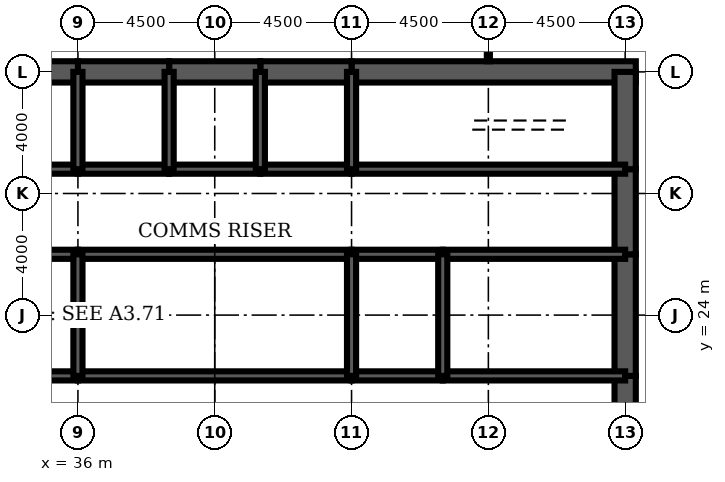
"""IFC4 building model, lengths in metres.
Left out: names, types, materials, properties, quantities, classifications, styles, units other than length and angle.
Written with IfcOpenShell. Run it as: python <this file> out.ifc"""

import sys

from ifc_helpers import new_model, si_unit, direction, frame, frame_2d, origin, place, context, subcontext, project, spatial, rectangle, extrude, element, fill, save


model = new_model("IFC4")
c1 = context("Model", 3, precision=1e-05, world=origin(), true_north=direction((0.0, 1.0)))
c2 = subcontext(c1, "Body", "Model", "MODEL_VIEW")
j1 = project(units=[si_unit("LENGTHUNIT", "METRE"), si_unit("PLANEANGLEUNIT", "RADIAN")], contexts=[c1])
p1 = place(None, origin())
s1 = spatial("IfcSite", under=j1, at=p1, CompositionType="ELEMENT")
p2 = place(p1, origin())
s2 = spatial("IfcBuilding", under=s1, at=p2, CompositionType="ELEMENT")
p3 = place(p2, frame((0.0, 0.0, 304.7)))
s3 = spatial("IfcBuildingStorey", under=s2, at=p3, CompositionType="ELEMENT", Elevation=304.7)
p4 = place(p3, frame((54.35, 32.0, 0.0), z_axis=(0.0, 0.0, 1.0), x_axis=(-1.0, 0.0, 0.0)))
e1 = element("IfcWall", 1, at=p4, inside=s3, PredefinedType="SHEAR", context=c2, shape_type="SweptSolid", body=[
    extrude(rectangle(XDim=9.35, YDim=0.7, at=frame_2d((4.675, 0.0))), origin(), (0.0, 0.0, 1.0), 4.2),
])
for number, where, z_axis, x_axis in (
    (2, (45.0, 32.0, 0.0), (0.0, 0.0, 1.0), (-1.0, 0.0, 0.0)),
    (3, (42.0, 32.0, 0.0), (0.0, 0.0, 1.0), (-1.0, 0.0, 0.0)),
    (4, (39.0, 32.0, 0.0), (0.0, 0.0, 1.0), (-1.0, 0.0, 0.0)),
    (5, (36.0, 32.0, 0.0), (0.0, 0.0, 1.0), (-1.0, 0.0, 0.0)),
):
    element("IfcWall", number, at=place(p3, frame(where, z_axis=z_axis, x_axis=x_axis)), inside=s3, PredefinedType="SHEAR", context=c2, shape_type="SweptSolid", body=[
        extrude(rectangle(XDim=3.0, YDim=0.7, at=frame_2d((1.5, 0.0))), origin(), (0.0, 0.0, 1.0), 4.2),
    ])
p5 = place(p3, frame((54.0, 19.2, 0.0), z_axis=(0.0, 0.0, 1.0), x_axis=(0.0, 1.0, 0.0)))
e6 = element("IfcWall", 6, at=p5, inside=s3, PredefinedType="SHEAR", context=c2, shape_type="SweptSolid", body=[
    extrude(rectangle(XDim=2.8, YDim=0.7, at=frame_2d((1.4, 0.0))), origin(), (0.0, 0.0, 1.0), 4.2),
])
p6 = place(p5, frame((0.4, 0.0, 0.0)))
e7 = element("IfcOpeningElement", 7, at=p6, cuts=e6, PredefinedType="OPENING", context=c2, shape_type="SweptSolid", body=[
    extrude(rectangle(XDim=1.8, YDim=2.1, at=frame_2d((0.9, 1.05))), frame((0.0, 0.36, 0.0), z_axis=(0.0, -1.0, 0.0), x_axis=(1.0, 0.0, 0.0)), (0.0, 0.0, 1.0), 0.72),
])
p7 = place(p3, frame((54.0, 22.0, 0.0), z_axis=(0.0, 0.0, 1.0), x_axis=(0.0, 1.0, 0.0)))
e8 = element("IfcWall", 8, at=p7, inside=s3, PredefinedType="SHEAR", context=c2, shape_type="SweptSolid", body=[
    extrude(rectangle(XDim=4.0, YDim=0.7, at=frame_2d((2.0, 0.0))), origin(), (0.0, 0.0, 1.0), 4.2),
])
p8 = place(p3, frame((54.0, 26.0, 0.0), z_axis=(0.0, 0.0, 1.0), x_axis=(0.0, 1.0, 0.0)))
e9 = element("IfcWall", 9, at=p8, inside=s3, PredefinedType="SHEAR", context=c2, shape_type="SweptSolid", body=[
    extrude(rectangle(XDim=2.8, YDim=0.7, at=frame_2d((1.4, 0.0))), origin(), (0.0, 0.0, 1.0), 4.2),
])
p9 = place(p8, frame((0.6, 0.0, 0.0)))
e10 = element("IfcOpeningElement", 10, at=p9, cuts=e9, PredefinedType="OPENING", context=c2, shape_type="SweptSolid", body=[
    extrude(rectangle(XDim=1.8, YDim=2.1, at=frame_2d((0.9, 1.05))), frame((0.0, 0.36, 0.0), z_axis=(0.0, -1.0, 0.0), x_axis=(1.0, 0.0, 0.0)), (0.0, 0.0, 1.0), 0.72),
])
p10 = place(p3, frame((54.0, 28.8, 0.0), z_axis=(0.0, 0.0, 1.0), x_axis=(0.0, 1.0, 0.0)))
e11 = element("IfcWall", 11, at=p10, inside=s3, PredefinedType="SHEAR", context=c2, shape_type="SweptSolid", body=[
    extrude(rectangle(XDim=3.2, YDim=0.7, at=frame_2d((1.6, 0.0))), origin(), (0.0, 0.0, 1.0), 4.2),
])
p11 = place(p3, frame((33.0, 28.8, 0.0), z_axis=(0.0, 0.0, 1.0), x_axis=(1.0, 0.0, 0.0)))
e12 = element("IfcWall", 12, at=p11, inside=s3, PredefinedType="SOLIDWALL", context=c2, shape_type="SweptSolid", body=[
    extrude(rectangle(XDim=3.0, YDim=0.3, at=frame_2d((1.5, 0.0))), origin(), (0.0, 0.0, 1.0), 4.2),
])
p12 = place(p11, frame((0.95, 0.0, 0.0)))
e13 = element("IfcOpeningElement", 13, at=p12, cuts=e12, PredefinedType="OPENING", context=c2, shape_type="SweptSolid", body=[
    extrude(rectangle(XDim=1.1, YDim=2.2, at=frame_2d((0.55, 1.1))), frame((0.0, 0.16, 0.0), z_axis=(0.0, -1.0, 0.0), x_axis=(1.0, 0.0, 0.0)), (0.0, 0.0, 1.0), 0.32),
])
p13 = place(p3, frame((36.0, 28.8, 0.0), z_axis=(0.0, 0.0, 1.0), x_axis=(1.0, 0.0, 0.0)))
e14 = element("IfcWall", 14, at=p13, inside=s3, PredefinedType="SOLIDWALL", context=c2, shape_type="SweptSolid", body=[
    extrude(rectangle(XDim=3.0, YDim=0.3, at=frame_2d((1.5, 0.0))), origin(), (0.0, 0.0, 1.0), 4.2),
])
p14 = place(p13, frame((1.0, 0.0, 0.0)))
e15 = element("IfcOpeningElement", 15, at=p14, cuts=e14, PredefinedType="OPENING", context=c2, shape_type="SweptSolid", body=[
    extrude(rectangle(XDim=1.0, YDim=2.1, at=frame_2d((0.5, 1.05))), frame((0.0, 0.16, 0.0), z_axis=(0.0, -1.0, 0.0), x_axis=(1.0, 0.0, 0.0)), (0.0, 0.0, 1.0), 0.32),
])
p15 = place(p3, frame((39.0, 28.8, 0.0), z_axis=(0.0, 0.0, 1.0), x_axis=(1.0, 0.0, 0.0)))
e16 = element("IfcWall", 16, at=p15, inside=s3, PredefinedType="SOLIDWALL", context=c2, shape_type="SweptSolid", body=[
    extrude(rectangle(XDim=3.0, YDim=0.3, at=frame_2d((1.5, 0.0))), origin(), (0.0, 0.0, 1.0), 4.2),
])
p16 = place(p15, frame((1.0, 0.0, 0.0)))
e17 = element("IfcOpeningElement", 17, at=p16, cuts=e16, PredefinedType="OPENING", context=c2, shape_type="SweptSolid", body=[
    extrude(rectangle(XDim=1.0, YDim=2.1, at=frame_2d((0.5, 1.05))), frame((0.0, 0.16, 0.0), z_axis=(0.0, -1.0, 0.0), x_axis=(1.0, 0.0, 0.0)), (0.0, 0.0, 1.0), 0.32),
])
p17 = place(p3, frame((42.0, 28.8, 0.0), z_axis=(0.0, 0.0, 1.0), x_axis=(1.0, 0.0, 0.0)))
e18 = element("IfcWall", 18, at=p17, inside=s3, PredefinedType="SOLIDWALL", context=c2, shape_type="SweptSolid", body=[
    extrude(rectangle(XDim=3.0, YDim=0.3, at=frame_2d((1.5, 0.0))), origin(), (0.0, 0.0, 1.0), 4.2),
])
p18 = place(p17, frame((0.95, 0.0, 0.0)))
e19 = element("IfcOpeningElement", 19, at=p18, cuts=e18, PredefinedType="OPENING", context=c2, shape_type="SweptSolid", body=[
    extrude(rectangle(XDim=1.1, YDim=2.2, at=frame_2d((0.55, 1.1))), frame((0.0, 0.16, 0.0), z_axis=(0.0, -1.0, 0.0), x_axis=(1.0, 0.0, 0.0)), (0.0, 0.0, 1.0), 0.32),
])
p19 = place(p3, frame((45.0, 28.8, 0.0), z_axis=(0.0, 0.0, 1.0), x_axis=(1.0, 0.0, 0.0)))
e20 = element("IfcWall", 20, at=p19, inside=s3, PredefinedType="SOLIDWALL", context=c2, shape_type="SweptSolid", body=[
    extrude(rectangle(XDim=9.0, YDim=0.3, at=frame_2d((4.5, 0.0))), origin(), (0.0, 0.0, 1.0), 4.2),
])
p20 = place(p19, frame((7.35, 0.0, 0.0)))
e21 = element("IfcOpeningElement", 21, at=p20, cuts=e20, PredefinedType="OPENING", context=c2, shape_type="SweptSolid", body=[
    extrude(rectangle(XDim=1.0, YDim=2.1, at=frame_2d((0.5, 1.05))), frame((0.0, 0.16, 0.0), z_axis=(0.0, -1.0, 0.0), x_axis=(1.0, 0.0, 0.0)), (0.0, 0.0, 1.0), 0.32),
])
p21 = place(p3, frame((27.0, 22.0, 0.0), z_axis=(0.0, 0.0, 1.0), x_axis=(1.0, 0.0, 0.0)))
e22 = element("IfcWall", 22, at=p21, inside=s3, PredefinedType="SOLIDWALL", context=c2, shape_type="SweptSolid", body=[
    extrude(rectangle(XDim=9.0, YDim=0.3, at=frame_2d((4.5, 0.0))), origin(), (0.0, 0.0, 1.0), 4.2),
])
p22 = place(p21, frame((4.0, 0.0, 0.0)))
e23 = element("IfcOpeningElement", 23, at=p22, cuts=e22, PredefinedType="OPENING", context=c2, shape_type="SweptSolid", body=[
    extrude(rectangle(XDim=1.0, YDim=2.1, at=frame_2d((0.5, 1.05))), frame((0.0, 0.16, 0.0), z_axis=(0.0, -1.0, 0.0), x_axis=(1.0, 0.0, 0.0)), (0.0, 0.0, 1.0), 0.32),
])
p23 = place(p3, frame((36.0, 22.0, 0.0), z_axis=(0.0, 0.0, 1.0), x_axis=(1.0, 0.0, 0.0)))
e24 = element("IfcWall", 24, at=p23, inside=s3, PredefinedType="SOLIDWALL", context=c2, shape_type="SweptSolid", body=[
    extrude(rectangle(XDim=9.0, YDim=0.3, at=frame_2d((4.5, 0.0))), origin(), (0.0, 0.0, 1.0), 4.2),
])
p24 = place(p23, frame((4.0, 0.0, 0.0)))
e25 = element("IfcOpeningElement", 25, at=p24, cuts=e24, PredefinedType="OPENING", context=c2, shape_type="SweptSolid", body=[
    extrude(rectangle(XDim=1.0, YDim=2.1, at=frame_2d((0.5, 1.05))), frame((0.0, 0.16, 0.0), z_axis=(0.0, -1.0, 0.0), x_axis=(1.0, 0.0, 0.0)), (0.0, 0.0, 1.0), 0.32),
])
p25 = place(p3, frame((45.0, 22.0, 0.0), z_axis=(0.0, 0.0, 1.0), x_axis=(1.0, 0.0, 0.0)))
e26 = element("IfcWall", 26, at=p25, inside=s3, PredefinedType="SOLIDWALL", context=c2, shape_type="SweptSolid", body=[
    extrude(rectangle(XDim=3.0, YDim=0.3, at=frame_2d((1.5, 0.0))), origin(), (0.0, 0.0, 1.0), 4.2),
])
p26 = place(p25, frame((1.0, 0.0, 0.0)))
e27 = element("IfcOpeningElement", 27, at=p26, cuts=e26, PredefinedType="OPENING", context=c2, shape_type="SweptSolid", body=[
    extrude(rectangle(XDim=1.0, YDim=2.1, at=frame_2d((0.5, 1.05))), frame((0.0, 0.16, 0.0), z_axis=(0.0, -1.0, 0.0), x_axis=(1.0, 0.0, 0.0)), (0.0, 0.0, 1.0), 0.32),
])
p27 = place(p3, frame((48.0, 22.0, 0.0), z_axis=(0.0, 0.0, 1.0), x_axis=(1.0, 0.0, 0.0)))
e28 = element("IfcWall", 28, at=p27, inside=s3, PredefinedType="SOLIDWALL", context=c2, shape_type="SweptSolid", body=[
    extrude(rectangle(XDim=6.0, YDim=0.3, at=frame_2d((3.0, 0.0))), origin(), (0.0, 0.0, 1.0), 4.2),
])
p28 = place(p27, frame((2.0, 0.0, 0.0)))
e29 = element("IfcOpeningElement", 29, at=p28, cuts=e28, PredefinedType="OPENING", context=c2, shape_type="SweptSolid", body=[
    extrude(rectangle(XDim=1.0, YDim=2.1, at=frame_2d((0.5, 1.05))), frame((0.0, 0.16, 0.0), z_axis=(0.0, -1.0, 0.0), x_axis=(1.0, 0.0, 0.0)), (0.0, 0.0, 1.0), 0.32),
])
p29 = place(p27, frame((4.4, 0.0, 0.0)))
e30 = element("IfcOpeningElement", 30, at=p29, cuts=e28, PredefinedType="OPENING", context=c2, shape_type="SweptSolid", body=[
    extrude(rectangle(XDim=1.0, YDim=2.1, at=frame_2d((0.5, 1.05))), frame((0.0, 0.16, 0.0), z_axis=(0.0, -1.0, 0.0), x_axis=(1.0, 0.0, 0.0)), (0.0, 0.0, 1.0), 0.32),
])
for number, where, z_axis, x_axis in (
    (31, (27.0, 26.0, 0.0), (0.0, 0.0, 1.0), (1.0, 0.0, 0.0)),
    (32, (36.0, 26.0, 0.0), (0.0, 0.0, 1.0), (1.0, 0.0, 0.0)),
):
    element("IfcWall", number, at=place(p3, frame(where, z_axis=z_axis, x_axis=x_axis)), inside=s3, PredefinedType="SOLIDWALL", context=c2, shape_type="SweptSolid", body=[
        extrude(rectangle(XDim=9.0, YDim=0.3, at=frame_2d((4.5, 0.0))), origin(), (0.0, 0.0, 1.0), 4.2),
    ])
p30 = place(p3, frame((45.0, 26.0, 0.0), z_axis=(0.0, 0.0, 1.0), x_axis=(1.0, 0.0, 0.0)))
e33 = element("IfcWall", 33, at=p30, inside=s3, PredefinedType="SOLIDWALL", context=c2, shape_type="SweptSolid", body=[
    extrude(rectangle(XDim=3.0, YDim=0.3, at=frame_2d((1.5, 0.0))), origin(), (0.0, 0.0, 1.0), 4.2),
])
p31 = place(p3, frame((48.0, 26.0, 0.0), z_axis=(0.0, 0.0, 1.0), x_axis=(1.0, 0.0, 0.0)))
e34 = element("IfcWall", 34, at=p31, inside=s3, PredefinedType="SOLIDWALL", context=c2, shape_type="SweptSolid", body=[
    extrude(rectangle(XDim=6.0, YDim=0.3, at=frame_2d((3.0, 0.0))), origin(), (0.0, 0.0, 1.0), 4.2),
])
for number, where, z_axis, x_axis in (
    (35, (36.0, 28.8, 0.0), (0.0, 0.0, 1.0), (0.0, 1.0, 0.0)),
    (36, (39.0, 28.8, 0.0), (0.0, 0.0, 1.0), (0.0, 1.0, 0.0)),
    (37, (42.0, 28.8, 0.0), (0.0, 0.0, 1.0), (0.0, 1.0, 0.0)),
    (38, (45.0, 28.8, 0.0), (0.0, 0.0, 1.0), (0.0, 1.0, 0.0)),
):
    element("IfcWall", number, at=place(p3, frame(where, z_axis=z_axis, x_axis=x_axis)), inside=s3, PredefinedType="SOLIDWALL", context=c2, shape_type="SweptSolid", body=[
        extrude(rectangle(XDim=3.2, YDim=0.3, at=frame_2d((1.6, 0.0))), origin(), (0.0, 0.0, 1.0), 4.2),
    ])
for number, where, z_axis, x_axis in (
    (39, (36.0, 22.0, 0.0), (0.0, 0.0, 1.0), (0.0, 1.0, 0.0)),
    (40, (45.0, 22.0, 0.0), (0.0, 0.0, 1.0), (0.0, 1.0, 0.0)),
    (41, (48.0, 22.0, 0.0), (0.0, 0.0, 1.0), (0.0, 1.0, 0.0)),
):
    element("IfcWall", number, at=place(p3, frame(where, z_axis=z_axis, x_axis=x_axis)), inside=s3, PredefinedType="SOLIDWALL", context=c2, shape_type="SweptSolid", body=[
        extrude(rectangle(XDim=4.0, YDim=0.3, at=frame_2d((2.0, 0.0))), origin(), (0.0, 0.0, 1.0), 4.2),
    ])
p32 = place(p3, frame((42.5, 22.15, 0.0), z_axis=(0.0, 0.0, 1.0), x_axis=(0.0, 1.0, 0.0)))
e42 = element("IfcWall", 42, at=p32, inside=s3, PredefinedType="PARTITIONING", context=c2, shape_type="SweptSolid", body=[
    extrude(rectangle(XDim=3.7, YDim=0.15, at=frame_2d((1.85, 0.0))), origin(), (0.0, 0.0, 1.0), 3.0),
])
p33 = place(p32, frame((2.2, 0.0, 0.0)))
e43 = element("IfcOpeningElement", 43, at=p33, cuts=e42, PredefinedType="OPENING", context=c2, shape_type="SweptSolid", body=[
    extrude(rectangle(XDim=1.0, YDim=2.1, at=frame_2d((0.5, 1.05))), frame((0.0, 0.085, 0.0), z_axis=(0.0, -1.0, 0.0), x_axis=(1.0, 0.0, 0.0)), (0.0, 0.0, 1.0), 0.17),
])
p34 = place(p3, frame((52.075, 22.15, 0.0), z_axis=(0.0, 0.0, 1.0), x_axis=(0.0, 1.0, 0.0)))
e44 = element("IfcWall", 44, at=p34, inside=s3, PredefinedType="PARTITIONING", context=c2, shape_type="SweptSolid", body=[
    extrude(rectangle(XDim=3.7, YDim=0.15, at=frame_2d((1.85, 0.0))), origin(), (0.0, 0.0, 1.0), 3.0),
])
p35 = place(p3, frame((47.7, 26.15, 0.0), z_axis=(0.0, 0.0, 1.0), x_axis=(0.0, 1.0, 0.0)))
e45 = element("IfcWall", 45, at=p35, inside=s3, PredefinedType="PARTITIONING", context=c2, shape_type="SweptSolid", body=[
    extrude(rectangle(XDim=2.5, YDim=0.15, at=frame_2d((1.25, 0.0))), origin(), (0.0, 0.0, 1.0), 3.0),
])
p36 = place(p35, frame((1.15, 0.0, 0.0)))
e46 = element("IfcOpeningElement", 46, at=p36, cuts=e45, PredefinedType="OPENING", context=c2, shape_type="SweptSolid", body=[
    extrude(rectangle(XDim=1.0, YDim=2.1, at=frame_2d((0.5, 1.05))), frame((0.0, 0.085, 0.0), z_axis=(0.0, -1.0, 0.0), x_axis=(1.0, 0.0, 0.0)), (0.0, 0.0, 1.0), 0.17),
])
p37 = place(p3, frame((49.5, 32.35, 0.0), z_axis=(0.0, 0.0, 1.0), x_axis=(0.0, 1.0, 0.0)))
e47 = element("IfcWall", 47, at=p37, inside=s3, PredefinedType="PARTITIONING", context=c2, shape_type="SweptSolid", body=[
    extrude(rectangle(XDim=5.2, YDim=0.1, at=frame_2d((2.6, 0.0))), origin(), (0.0, 0.0, 1.0), 3.0),
])
p38 = place(p37, frame((1.8, 0.0, 0.0)))
e48 = element("IfcOpeningElement", 48, at=p38, cuts=e47, PredefinedType="OPENING", context=c2, shape_type="SweptSolid", body=[
    extrude(rectangle(XDim=1.6, YDim=2.1, at=frame_2d((0.8, 1.05))), frame((0.0, 0.06, 0.0), z_axis=(0.0, -1.0, 0.0), x_axis=(1.0, 0.0, 0.0)), (0.0, 0.0, 1.0), 0.12),
])
p39 = place(p33, origin())
e49 = element("IfcDoor", 49, at=p39, inside=s3, OperationType="SINGLE_SWING_RIGHT", PredefinedType="DOOR", context=c2, shape_type="SweptSolid", body=[
    extrude(rectangle(XDim=1.0, YDim=2.1, at=frame_2d((0.5, 1.05))), frame((0.0, 0.025, 0.0), z_axis=(0.0, -1.0, 0.0), x_axis=(1.0, 0.0, 0.0)), (0.0, 0.0, 1.0), 0.05),
])
fill(e43, e49)
p40 = place(p36, origin())
e50 = element("IfcDoor", 50, at=p40, inside=s3, OperationType="SINGLE_SWING_RIGHT", PredefinedType="DOOR", context=c2, shape_type="SweptSolid", body=[
    extrude(rectangle(XDim=1.0, YDim=2.1, at=frame_2d((0.5, 1.05))), frame((0.0, 0.025, 0.0), z_axis=(0.0, -1.0, 0.0), x_axis=(1.0, 0.0, 0.0)), (0.0, 0.0, 1.0), 0.05),
])
fill(e46, e50)
p41 = place(p18, origin())
e51 = element("IfcDoor", 51, at=p41, inside=s3, OperationType="DOUBLE_DOOR_SLIDING", PredefinedType="USERDEFINED", context=c2, shape_type="SweptSolid", body=[
    extrude(rectangle(XDim=1.1, YDim=2.2, at=frame_2d((0.55, 1.1))), frame((0.0, 0.025, 0.0), z_axis=(0.0, -1.0, 0.0), x_axis=(1.0, 0.0, 0.0)), (0.0, 0.0, 1.0), 0.05),
])
fill(e19, e51)
p42 = place(p20, origin())
e52 = element("IfcDoor", 52, at=p42, inside=s3, OperationType="SINGLE_SWING_RIGHT", PredefinedType="DOOR", context=c2, shape_type="SweptSolid", body=[
    extrude(rectangle(XDim=1.0, YDim=2.1, at=frame_2d((0.5, 1.05))), frame((0.0, 0.025, 0.0), z_axis=(0.0, -1.0, 0.0), x_axis=(1.0, 0.0, 0.0)), (0.0, 0.0, 1.0), 0.05),
])
fill(e21, e52)
p43 = place(p6, origin())
e53 = element("IfcDoor", 53, at=p43, inside=s3, OperationType="SINGLE_SWING_LEFT", PredefinedType="DOOR", context=c2, shape_type="SweptSolid", body=[
    extrude(rectangle(XDim=1.8, YDim=2.1, at=frame_2d((0.9, 1.05))), frame((0.0, 0.35, 0.0), z_axis=(0.0, -1.0, 0.0), x_axis=(1.0, 0.0, 0.0)), (0.0, 0.0, 1.0), 0.699),
])
fill(e7, e53)
p44 = place(p9, origin())
e54 = element("IfcDoor", 54, at=p44, inside=s3, OperationType="SINGLE_SWING_LEFT", PredefinedType="DOOR", context=c2, shape_type="SweptSolid", body=[
    extrude(rectangle(XDim=1.8, YDim=2.1, at=frame_2d((0.9, 1.05))), frame((0.0, 0.35, 0.0), z_axis=(0.0, -1.0, 0.0), x_axis=(1.0, 0.0, 0.0)), (0.0, 0.0, 1.0), 0.699),
])
fill(e10, e54)
p45 = place(p24, origin())
e55 = element("IfcDoor", 55, at=p45, inside=s3, OperationType="SINGLE_SWING_LEFT", PredefinedType="DOOR", context=c2, shape_type="SweptSolid", body=[
    extrude(rectangle(XDim=1.0, YDim=2.1, at=frame_2d((0.5, 1.05))), frame((0.0, 0.025, 0.0), z_axis=(0.0, -1.0, 0.0), x_axis=(1.0, 0.0, 0.0)), (0.0, 0.0, 1.0), 0.05),
])
fill(e25, e55)
p46 = place(p26, origin())
e56 = element("IfcDoor", 56, at=p46, inside=s3, OperationType="SINGLE_SWING_LEFT", PredefinedType="DOOR", context=c2, shape_type="SweptSolid", body=[
    extrude(rectangle(XDim=1.0, YDim=2.1, at=frame_2d((0.5, 1.05))), frame((0.0, 0.025, 0.0), z_axis=(0.0, -1.0, 0.0), x_axis=(1.0, 0.0, 0.0)), (0.0, 0.0, 1.0), 0.05),
])
fill(e27, e56)
p47 = place(p28, origin())
e57 = element("IfcDoor", 57, at=p47, inside=s3, OperationType="SINGLE_SWING_LEFT", PredefinedType="DOOR", context=c2, shape_type="SweptSolid", body=[
    extrude(rectangle(XDim=1.0, YDim=2.1, at=frame_2d((0.5, 1.05))), frame((0.0, 0.025, 0.0), z_axis=(0.0, -1.0, 0.0), x_axis=(1.0, 0.0, 0.0)), (0.0, 0.0, 1.0), 0.05),
])
fill(e29, e57)
p48 = place(p29, origin())
e58 = element("IfcDoor", 58, at=p48, inside=s3, OperationType="SINGLE_SWING_RIGHT", PredefinedType="DOOR", context=c2, shape_type="SweptSolid", body=[
    extrude(rectangle(XDim=1.0, YDim=2.1, at=frame_2d((0.5, 1.05))), frame((0.0, 0.025, 0.0), z_axis=(0.0, -1.0, 0.0), x_axis=(1.0, 0.0, 0.0)), (0.0, 0.0, 1.0), 0.05),
])
fill(e30, e58)
p49 = place(p14, origin())
e59 = element("IfcDoor", 59, at=p49, inside=s3, OperationType="SINGLE_SWING_LEFT", PredefinedType="DOOR", context=c2, shape_type="SweptSolid", body=[
    extrude(rectangle(XDim=1.0, YDim=2.1, at=frame_2d((0.5, 1.05))), frame((0.0, 0.025, 0.0), z_axis=(0.0, -1.0, 0.0), x_axis=(1.0, 0.0, 0.0)), (0.0, 0.0, 1.0), 0.05),
])
fill(e15, e59)
p50 = place(p16, origin())
e60 = element("IfcDoor", 60, at=p50, inside=s3, OperationType="SINGLE_SWING_LEFT", PredefinedType="DOOR", context=c2, shape_type="SweptSolid", body=[
    extrude(rectangle(XDim=1.0, YDim=2.1, at=frame_2d((0.5, 1.05))), frame((0.0, 0.025, 0.0), z_axis=(0.0, -1.0, 0.0), x_axis=(1.0, 0.0, 0.0)), (0.0, 0.0, 1.0), 0.05),
])
fill(e17, e60)
save(model, sys.argv[1])
